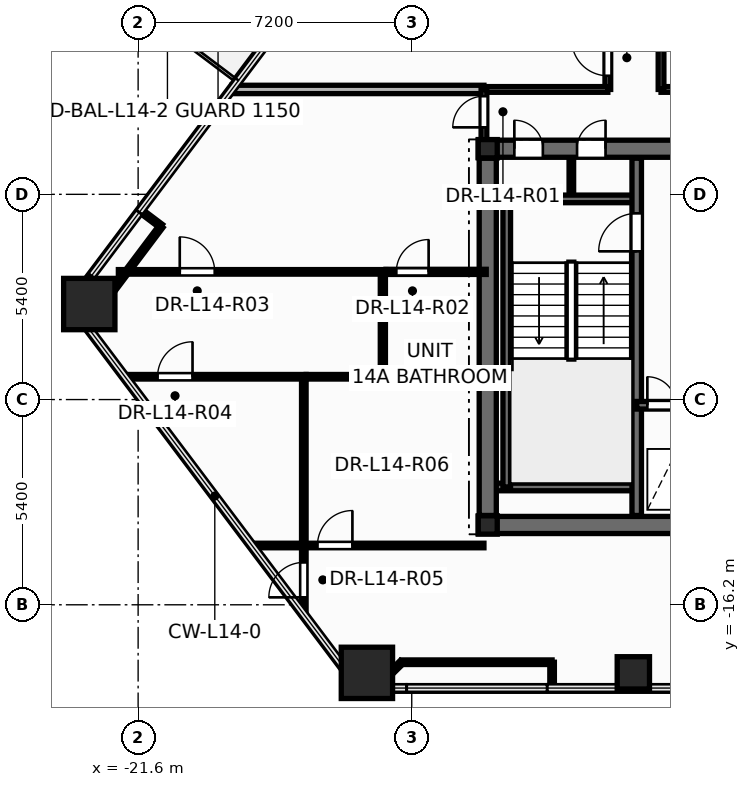
"""IFC4 building model, lengths in metres.
Left out: names, types, materials, properties, quantities, classifications, styles, units other than length and angle.
Written with IfcOpenShell. Run it as: python <this file> out.ifc"""

import sys

from ifc_helpers import new_model, si_unit, direction, frame, frame_2d, origin, origin_2d, place, context, subcontext, project, spatial, rectangle, hollow_rectangle, hollow_circle, i_section, extrude, element, fill, save


model = new_model("IFC4")
c1 = context("Model", 3, precision=1e-05, world=origin(), true_north=direction((0.0, 1.0)))
c2 = subcontext(c1, "Body", "Model", "MODEL_VIEW")
j1 = project(units=[si_unit("LENGTHUNIT", "METRE"), si_unit("PLANEANGLEUNIT", "RADIAN")], contexts=[c1])
p1 = place(None, origin())
s1 = spatial("IfcSite", under=j1, at=p1, CompositionType="ELEMENT")
p2 = place(p1, origin())
s2 = spatial("IfcBuilding", under=s1, at=p2, CompositionType="ELEMENT")
p3 = place(p2, frame((0.0, 0.0, 56.7)))
s3 = spatial("IfcBuildingStorey", under=s2, at=p3, CompositionType="ELEMENT", Elevation=56.7)
for number, where, z_axis, x_axis in (
    (1, (-22.885, -8.287, 0.0), (0.0, 0.0, 1.0), (1.0, 0.0, 0.0)),
    (2, (-15.58, -17.991, 0.0), (0.0, 0.0, 1.0), (1.0, 0.0, 0.0)),
):
    element("IfcColumn", number, at=place(p3, frame(where, z_axis=z_axis, x_axis=x_axis)), inside=s3, PredefinedType="COLUMN", context=c2, shape_type="SweptSolid", body=[
        extrude(hollow_rectangle(XDim=1.35, YDim=1.35, WallThickness=0.065, at=origin_2d()), origin(), (0.0, 0.0, 1.0), 3.6),
    ])
p4 = place(p3, frame((-8.569, -17.991, 0.0), z_axis=(0.0, 0.0, 1.0), x_axis=(1.0, 0.0, 0.0)))
e3 = element("IfcColumn", 3, at=p4, inside=s3, PredefinedType="COLUMN", context=c2, shape_type="SweptSolid", body=[
    extrude(hollow_circle(Radius=0.425, WallThickness=0.038, at=origin_2d()), origin(), (0.0, 0.0, 1.0), 3.6),
])
for number, where, z_axis, x_axis in (
    (4, (-12.4, -14.1, 0.0), (0.0, 0.0, 1.0), (1.0, 0.0, 0.0)),
    (5, (-12.4, -4.2, 0.0), (0.0, 0.0, 1.0), (1.0, 0.0, 0.0)),
):
    element("IfcColumn", number, at=place(p3, frame(where, z_axis=z_axis, x_axis=x_axis)), inside=s3, PredefinedType="COLUMN", context=c2, shape_type="SweptSolid", body=[
        extrude(i_section(OverallWidth=0.5, OverallDepth=0.482, WebThickness=0.04, FlangeThickness=0.045, at=origin_2d()), origin(), (0.0, 0.0, 1.0), 3.6),
    ])
p5 = place(p3, frame((-10.2, -5.52, 0.0), z_axis=(0.0, 0.0, 1.0), x_axis=(0.0, 1.0, 0.0)))
e6 = element("IfcWall", 6, at=p5, inside=s3, PredefinedType="PARTITIONING", context=c2, shape_type="SweptSolid", body=[
    extrude(rectangle(XDim=1.12, YDim=0.12, at=frame_2d((0.56, 0.0))), origin(), (0.0, 0.0, 1.0), 3.32),
])
p6 = place(p3, frame((-12.65, -14.1, 0.0), z_axis=(0.0, 0.0, 1.0), x_axis=(1.0, 0.0, 0.0)))
e7 = element("IfcWall", 7, at=p6, inside=s3, PredefinedType="SHEAR", context=c2, shape_type="SweptSolid", body=[
    extrude(rectangle(XDim=25.3, YDim=0.45, at=frame_2d((12.65, 0.0))), origin(), (0.0, 0.0, 1.0), 3.6),
])
p7 = place(p3, frame((-12.65, -4.2, 0.0), z_axis=(0.0, 0.0, 1.0), x_axis=(1.0, 0.0, 0.0)))
e8 = element("IfcWall", 8, at=p7, inside=s3, PredefinedType="SHEAR", context=c2, shape_type="SweptSolid", body=[
    extrude(rectangle(XDim=25.3, YDim=0.45, at=frame_2d((12.65, 0.0))), origin(), (0.0, 0.0, 1.0), 3.6),
])
p8 = place(p7, frame((0.95, 0.0, 0.0)))
e9 = element("IfcOpeningElement", 9, at=p8, cuts=e8, PredefinedType="OPENING", context=c2, shape_type="SweptSolid", body=[
    extrude(rectangle(XDim=0.756, YDim=2.054, at=frame_2d((0.375, 1.027))), frame((0.0, 0.235, 0.0), z_axis=(0.0, -1.0, 0.0), x_axis=(1.0, 0.0, 0.0)), (0.0, 0.0, 1.0), 0.47),
])
p9 = place(p7, frame((2.6, 0.0, 0.0)))
e10 = element("IfcOpeningElement", 10, at=p9, cuts=e8, PredefinedType="OPENING", context=c2, shape_type="SweptSolid", body=[
    extrude(rectangle(XDim=0.756, YDim=2.054, at=frame_2d((0.375, 1.027))), frame((0.0, 0.235, 0.0), z_axis=(0.0, -1.0, 0.0), x_axis=(1.0, 0.0, 0.0)), (0.0, 0.0, 1.0), 0.47),
])
p10 = place(p7, frame((21.85, 0.0, 0.0)))
e11 = element("IfcOpeningElement", 11, at=p10, cuts=e8, PredefinedType="OPENING", context=c2, shape_type="SweptSolid", body=[
    extrude(rectangle(XDim=0.756, YDim=2.054, at=frame_2d((0.375, 1.027))), frame((0.0, 0.235, 0.0), z_axis=(0.0, -1.0, 0.0), x_axis=(1.0, 0.0, 0.0)), (0.0, 0.0, 1.0), 0.47),
])
p11 = place(p7, frame((23.5, 0.0, 0.0)))
e12 = element("IfcOpeningElement", 12, at=p11, cuts=e8, PredefinedType="OPENING", context=c2, shape_type="SweptSolid", body=[
    extrude(rectangle(XDim=0.756, YDim=2.054, at=frame_2d((0.375, 1.027))), frame((0.0, 0.235, 0.0), z_axis=(0.0, -1.0, 0.0), x_axis=(1.0, 0.0, 0.0)), (0.0, 0.0, 1.0), 0.47),
])
p12 = place(p7, frame((5.85, 0.0, 0.0)))
e13 = element("IfcOpeningElement", 13, at=p12, cuts=e8, PredefinedType="OPENING", context=c2, shape_type="SweptSolid", body=[
    extrude(rectangle(XDim=1.006, YDim=2.104, at=frame_2d((0.5, 1.052))), frame((0.0, 0.235, 0.0), z_axis=(0.0, -1.0, 0.0), x_axis=(1.0, 0.0, 0.0)), (0.0, 0.0, 1.0), 0.47),
])
p13 = place(p7, frame((10.35, 0.0, 0.0)))
e14 = element("IfcOpeningElement", 14, at=p13, cuts=e8, PredefinedType="OPENING", context=c2, shape_type="SweptSolid", body=[
    extrude(rectangle(XDim=1.406, YDim=2.154, at=frame_2d((0.7, 1.077))), frame((0.0, 0.235, 0.0), z_axis=(0.0, -1.0, 0.0), x_axis=(1.0, 0.0, 0.0)), (0.0, 0.0, 1.0), 0.47),
])
p14 = place(p7, frame((18.45, 0.0, 0.0)))
e15 = element("IfcOpeningElement", 15, at=p14, cuts=e8, PredefinedType="OPENING", context=c2, shape_type="SweptSolid", body=[
    extrude(rectangle(XDim=1.006, YDim=2.104, at=frame_2d((0.5, 1.052))), frame((0.0, 0.235, 0.0), z_axis=(0.0, -1.0, 0.0), x_axis=(1.0, 0.0, 0.0)), (0.0, 0.0, 1.0), 0.47),
])
for number, where, z_axis, x_axis in (
    (16, (-12.35, -5.52, 0.0), (0.0, 0.0, 1.0), (1.0, 0.0, 0.0)),
    (17, (-12.35, -13.1, 0.0), (0.0, 0.0, 1.0), (1.0, 0.0, 0.0)),
):
    element("IfcWall", number, at=place(p3, frame(where, z_axis=z_axis, x_axis=x_axis)), inside=s3, PredefinedType="SOLIDWALL", context=c2, shape_type="SweptSolid", body=[
        extrude(rectangle(XDim=3.87, YDim=0.2, at=frame_2d((1.935, 0.0))), origin(), (0.0, 0.0, 1.0), 3.6),
    ])
p15 = place(p3, frame((-11.9, -13.1, 0.0), z_axis=(0.0, 0.0, 1.0), x_axis=(0.0, 1.0, 0.0)))
e18 = element("IfcWall", 18, at=p15, inside=s3, PredefinedType="SOLIDWALL", context=c2, shape_type="SweptSolid", body=[
    extrude(rectangle(XDim=7.58, YDim=0.2, at=frame_2d((3.79, 0.0))), origin(), (0.0, 0.0, 1.0), 3.6),
])
p16 = place(p3, frame((-8.48, -13.85, 0.0), z_axis=(0.0, 0.0, 1.0), x_axis=(0.0, 1.0, 0.0)))
e19 = element("IfcWall", 19, at=p16, inside=s3, PredefinedType="SHEAR", context=c2, shape_type="SweptSolid", body=[
    extrude(rectangle(XDim=9.4, YDim=0.25, at=frame_2d((4.7, 0.0))), origin(), (0.0, 0.0, 1.0), 3.6),
])
p17 = place(p16, frame((6.95, 0.0, 0.0)))
e20 = element("IfcOpeningElement", 20, at=p17, cuts=e19, PredefinedType="OPENING", context=c2, shape_type="SweptSolid", body=[
    extrude(rectangle(XDim=1.006, YDim=2.104, at=frame_2d((0.5, 1.052))), frame((0.0, 0.135, 0.0), z_axis=(0.0, -1.0, 0.0), x_axis=(1.0, 0.0, 0.0)), (0.0, 0.0, 1.0), 0.27),
])
p18 = place(p3, frame((-8.48, -10.95, 0.0), z_axis=(0.0, 0.0, 1.0), x_axis=(1.0, 0.0, 0.0)))
e21 = element("IfcWall", 21, at=p18, inside=s3, PredefinedType="SOLIDWALL", context=c2, shape_type="SweptSolid", body=[
    extrude(rectangle(XDim=3.36, YDim=0.2, at=frame_2d((1.68, 0.0))), origin(), (0.0, 0.0, 1.0), 3.6),
])
p19 = place(p18, frame((0.28, 0.0, 0.0)))
e22 = element("IfcOpeningElement", 22, at=p19, cuts=e21, PredefinedType="OPENING", context=c2, shape_type="SweptSolid", body=[
    extrude(rectangle(XDim=0.756, YDim=2.054, at=frame_2d((0.375, 1.027))), frame((0.0, 0.11, 0.0), z_axis=(0.0, -1.0, 0.0), x_axis=(1.0, 0.0, 0.0)), (0.0, 0.0, 1.0), 0.22),
])
p20 = place(p18, frame((1.85, 0.0, 0.0)))
e23 = element("IfcOpeningElement", 23, at=p20, cuts=e21, PredefinedType="OPENING", context=c2, shape_type="SweptSolid", body=[
    extrude(rectangle(XDim=1.106, YDim=2.104, at=frame_2d((0.55, 1.052))), frame((0.0, 0.11, 0.0), z_axis=(0.0, -1.0, 0.0), x_axis=(1.0, 0.0, 0.0)), (0.0, 0.0, 1.0), 0.22),
])
p21 = place(p3, frame((-12.4, -13.85, 0.0), z_axis=(0.0, 0.0, 1.0), x_axis=(0.0, 1.0, 0.0)))
e24 = element("IfcWall", 24, at=p21, inside=s3, PredefinedType="SHEAR", context=c2, shape_type="SweptSolid", body=[
    extrude(rectangle(XDim=9.4, YDim=0.45, at=frame_2d((4.7, 0.0))), origin(), (0.0, 0.0, 1.0), 3.6),
])
p22 = place(p3, frame((-7.84, -2.64, 0.0), z_axis=(0.0, 0.0, 1.0), x_axis=(1.0, 0.0, 0.0)))
e25 = element("IfcWall", 25, at=p22, inside=s3, PredefinedType="PARTITIONING", context=c2, shape_type="SweptSolid", body=[
    extrude(rectangle(XDim=9.1, YDim=0.15, at=frame_2d((4.55, 0.0))), origin(), (0.0, 0.0, 1.0), 2.295),
])
p23 = place(p22, frame((2.117, 0.0, 0.0)))
e26 = element("IfcOpeningElement", 26, at=p23, cuts=e25, PredefinedType="OPENING", context=c2, shape_type="SweptSolid", body=[
    extrude(rectangle(XDim=0.956, YDim=2.104, at=frame_2d((0.475, 1.052))), frame((0.0, 0.085, 0.0), z_axis=(0.0, -1.0, 0.0), x_axis=(1.0, 0.0, 0.0)), (0.0, 0.0, 1.0), 0.17),
])
p24 = place(p3, frame((-9.24, -2.64, 0.0), z_axis=(0.0, 0.0, 1.0), x_axis=(0.0, 1.0, 0.0)))
e27 = element("IfcWall", 27, at=p24, inside=s3, PredefinedType="PARTITIONING", context=c2, shape_type="SweptSolid", body=[
    extrude(rectangle(XDim=8.5, YDim=0.15, at=frame_2d((4.25, 0.0))), origin(), (0.0, 0.0, 1.0), 2.479),
])
p25 = place(p24, frame((0.36, 0.0, 0.0)))
e28 = element("IfcOpeningElement", 28, at=p25, cuts=e27, PredefinedType="OPENING", context=c2, shape_type="SweptSolid", body=[
    extrude(rectangle(XDim=0.956, YDim=2.104, at=frame_2d((0.475, 1.052))), frame((0.0, 0.085, 0.0), z_axis=(0.0, -1.0, 0.0), x_axis=(1.0, 0.0, 0.0)), (0.0, 0.0, 1.0), 0.17),
])
p26 = place(p3, frame((-7.84, -2.64, 0.0), z_axis=(0.0, 0.0, 1.0), x_axis=(0.0, 1.0, 0.0)))
e29 = element("IfcWall", 29, at=p26, inside=s3, PredefinedType="PARTITIONING", context=c2, shape_type="SweptSolid", body=[
    extrude(rectangle(XDim=8.84, YDim=0.15, at=frame_2d((4.42, 0.0))), origin(), (0.0, 0.0, 1.0), 2.479),
])
p27 = place(p3, frame((-22.12, -7.44, 0.0), z_axis=(0.0, 0.0, 1.0), x_axis=(1.0, 0.0, 0.0)))
e30 = element("IfcWall", 30, at=p27, inside=s3, PredefinedType="PARTITIONING", context=c2, shape_type="SweptSolid", body=[
    extrude(rectangle(XDim=7.04, YDim=0.12, at=frame_2d((3.52, 0.0))), origin(), (0.0, 0.0, 1.0), 2.295),
])
p28 = place(p27, frame((1.615, 0.0, 0.0)))
e31 = element("IfcOpeningElement", 31, at=p28, cuts=e30, PredefinedType="OPENING", context=c2, shape_type="SweptSolid", body=[
    extrude(rectangle(XDim=0.926, YDim=2.104, at=frame_2d((0.46, 1.052))), frame((0.0, 0.07, 0.0), z_axis=(0.0, -1.0, 0.0), x_axis=(1.0, 0.0, 0.0)), (0.0, 0.0, 1.0), 0.14),
])
p29 = place(p3, frame((-19.135, -2.64, 0.0), z_axis=(0.0, 0.0, 1.0), x_axis=(1.0, 0.0, 0.0)))
e32 = element("IfcWall", 32, at=p29, inside=s3, PredefinedType="PARTITIONING", context=c2, shape_type="SweptSolid", body=[
    extrude(rectangle(XDim=6.635, YDim=0.22, at=frame_2d((3.318, 0.0))), origin(), (0.0, 0.0, 1.0), 2.683),
])
p30 = place(p3, frame((-17.24, -16.45, 0.0), z_axis=(0.0, 0.0, 1.0), x_axis=(0.0, 1.0, 0.0)))
e33 = element("IfcWall", 33, at=p30, inside=s3, PredefinedType="PARTITIONING", context=c2, shape_type="SweptSolid", body=[
    extrude(rectangle(XDim=6.25, YDim=0.12, at=frame_2d((3.125, 0.0))), origin(), (0.0, 0.0, 1.0), 2.683),
])
p31 = place(p30, frame((0.446, 0.0, 0.0)))
e34 = element("IfcOpeningElement", 34, at=p31, cuts=e33, PredefinedType="OPENING", context=c2, shape_type="SweptSolid", body=[
    extrude(rectangle(XDim=0.926, YDim=2.104, at=frame_2d((0.46, 1.052))), frame((0.0, 0.07, 0.0), z_axis=(0.0, -1.0, 0.0), x_axis=(1.0, 0.0, 0.0)), (0.0, 0.0, 1.0), 0.14),
])
p32 = place(p3, frame((-18.603, -14.64, 0.0), z_axis=(0.0, 0.0, 1.0), x_axis=(1.0, 0.0, 0.0)))
e35 = element("IfcWall", 35, at=p32, inside=s3, PredefinedType="PARTITIONING", context=c2, shape_type="SweptSolid", body=[
    extrude(rectangle(XDim=6.103, YDim=0.12, at=frame_2d((3.052, 0.0))), origin(), (0.0, 0.0, 1.0), 2.683),
])
p33 = place(p32, frame((1.722, 0.0, 0.0)))
e36 = element("IfcOpeningElement", 36, at=p33, cuts=e35, PredefinedType="OPENING", context=c2, shape_type="SweptSolid", body=[
    extrude(rectangle(XDim=0.926, YDim=2.104, at=frame_2d((0.46, 1.052))), frame((0.0, 0.07, 0.0), z_axis=(0.0, -1.0, 0.0), x_axis=(1.0, 0.0, 0.0)), (0.0, 0.0, 1.0), 0.14),
])
p34 = place(p3, frame((-21.946, -10.2, 0.0), z_axis=(0.0, 0.0, 1.0), x_axis=(1.0, 0.0, 0.0)))
e37 = element("IfcWall", 37, at=p34, inside=s3, PredefinedType="PARTITIONING", context=c2, shape_type="SweptSolid", body=[
    extrude(rectangle(XDim=4.766, YDim=0.12, at=frame_2d((2.383, 0.0))), origin(), (0.0, 0.0, 1.0), 2.683),
])
p35 = place(p34, frame((0.857, 0.0, 0.0)))
e38 = element("IfcOpeningElement", 38, at=p35, cuts=e37, PredefinedType="OPENING", context=c2, shape_type="SweptSolid", body=[
    extrude(rectangle(XDim=0.926, YDim=2.104, at=frame_2d((0.46, 1.052))), frame((0.0, 0.07, 0.0), z_axis=(0.0, -1.0, 0.0), x_axis=(1.0, 0.0, 0.0)), (0.0, 0.0, 1.0), 0.14),
])
p36 = place(p3, frame((-14.666, -17.711, 0.0), z_axis=(0.0, 0.0, 1.0), x_axis=(1.0, 0.0, 0.0)))
e39 = element("IfcWall", 39, at=p36, inside=s3, PredefinedType="PARTITIONING", context=c2, shape_type="SweptSolid", body=[
    extrude(rectangle(XDim=3.959, YDim=0.12, at=frame_2d((1.979, 0.0))), origin(), (0.0, 0.0, 1.0), 3.32),
])
p37 = place(p3, frame((-12.5, -2.64, 0.0), z_axis=(0.0, 0.0, 1.0), x_axis=(1.0, 0.0, 0.0)))
e40 = element("IfcWall", 40, at=p37, inside=s3, PredefinedType="PARTITIONING", context=c2, shape_type="SweptSolid", body=[
    extrude(rectangle(XDim=3.26, YDim=0.15, at=frame_2d((1.63, 0.0))), origin(), (0.0, 0.0, 1.0), 3.32),
])
p38 = place(p3, frame((-15.078, -7.44, 0.0), z_axis=(0.0, 0.0, 1.0), x_axis=(1.0, 0.0, 0.0)))
e41 = element("IfcWall", 41, at=p38, inside=s3, PredefinedType="PARTITIONING", context=c2, shape_type="SweptSolid", body=[
    extrude(rectangle(XDim=2.638, YDim=0.135, at=frame_2d((1.319, 0.0))), origin(), (0.0, 0.0, 1.0), 2.683),
])
p39 = place(p38, frame((0.272, 0.0, 0.0)))
e42 = element("IfcOpeningElement", 42, at=p39, cuts=e41, PredefinedType="OPENING", context=c2, shape_type="SweptSolid", body=[
    extrude(rectangle(XDim=0.856, YDim=2.104, at=frame_2d((0.425, 1.052))), frame((0.0, 0.078, 0.0), z_axis=(0.0, -1.0, 0.0), x_axis=(1.0, 0.0, 0.0)), (0.0, 0.0, 1.0), 0.155),
])
p40 = place(p3, frame((-15.16, -10.2, 0.0), z_axis=(0.0, 0.0, 1.0), x_axis=(0.0, 1.0, 0.0)))
e43 = element("IfcWall", 43, at=p40, inside=s3, PredefinedType="PARTITIONING", context=c2, shape_type="SweptSolid", body=[
    extrude(rectangle(XDim=2.76, YDim=0.135, at=frame_2d((1.38, 0.0))), origin(), (0.0, 0.0, 1.0), 3.32),
])
p41 = place(p3, frame((-15.16, -10.2, 0.0), z_axis=(0.0, 0.0, 1.0), x_axis=(1.0, 0.0, 0.0)))
e44 = element("IfcWall", 44, at=p41, inside=s3, PredefinedType="PARTITIONING", context=c2, shape_type="SweptSolid", body=[
    extrude(rectangle(XDim=2.72, YDim=0.135, at=frame_2d((1.36, 0.0))), origin(), (0.0, 0.0, 1.0), 2.683),
])
p42 = place(p3, frame((-20.994, -6.239, 0.0), z_axis=(0.0, 0.0, 1.0), x_axis=(-0.601407243549, -0.798942630861, 0.0)))
e45 = element("IfcWall", 45, at=p42, inside=s3, PredefinedType="PARTITIONING", context=c2, shape_type="SweptSolid", body=[
    extrude(rectangle(XDim=2.247, YDim=0.12, at=frame_2d((1.124, 0.0))), origin(), (0.0, 0.0, 1.0), 2.295),
])
p43 = place(p3, frame((-17.178, -10.2, 0.0), z_axis=(0.0, 0.0, 1.0), x_axis=(1.0, 0.0, 0.0)))
e46 = element("IfcWall", 46, at=p43, inside=s3, PredefinedType="PARTITIONING", context=c2, shape_type="SweptSolid", body=[
    extrude(rectangle(XDim=2.018, YDim=0.12, at=frame_2d((1.009, 0.0))), origin(), (0.0, 0.0, 1.0), 3.32),
])
p44 = place(p3, frame((-12.5, -4.24, 0.0), z_axis=(0.0, 0.0, 1.0), x_axis=(0.0, 1.0, 0.0)))
e47 = element("IfcWall", 47, at=p44, inside=s3, PredefinedType="PARTITIONING", context=c2, shape_type="SweptSolid", body=[
    extrude(rectangle(XDim=1.6, YDim=0.15, at=frame_2d((0.8, 0.0))), origin(), (0.0, 0.0, 1.0), 2.295),
])
p45 = place(p44, frame((0.602, 0.0, 0.0)))
e48 = element("IfcOpeningElement", 48, at=p45, cuts=e47, PredefinedType="OPENING", context=c2, shape_type="SweptSolid", body=[
    extrude(rectangle(XDim=0.826, YDim=2.104, at=frame_2d((0.41, 1.052))), frame((0.0, 0.085, 0.0), z_axis=(0.0, -1.0, 0.0), x_axis=(1.0, 0.0, 0.0)), (0.0, 0.0, 1.0), 0.17),
])
p46 = place(p3, frame((-15.271, -18.307, 0.0), z_axis=(0.0, 0.0, 1.0), x_axis=(0.712544720488, 0.701626696545, 0.0)))
e49 = element("IfcWall", 49, at=p46, inside=s3, PredefinedType="PARTITIONING", context=c2, shape_type="SweptSolid", body=[
    extrude(rectangle(XDim=0.85, YDim=0.12, at=frame_2d((0.425, 0.0))), origin(), (0.0, 0.0, 1.0), 2.683),
])
p47 = place(p3, frame((-22.345, -8.034, 0.0), z_axis=(0.0, 0.0, 1.0), x_axis=(-0.993721326988, -0.111883530014, 0.0)))
e50 = element("IfcWall", 50, at=p47, inside=s3, PredefinedType="PARTITIONING", context=c2, shape_type="SweptSolid", body=[
    extrude(rectangle(XDim=0.849, YDim=0.12, at=frame_2d((0.424, 0.0))), origin(), (0.0, 0.0, 1.0), 2.295),
])
for number, where, z_axis, x_axis in (
    (51, (-10.707, -17.711, 0.0), (0.0, 0.0, 1.0), (0.0, -1.0, 0.0)),
    (52, (-21.529, -5.836, 0.0), (0.0, 0.0, 1.0), (0.799, -0.602, 0.0)),
):
    element("IfcWall", number, at=place(p3, frame(where, z_axis=z_axis, x_axis=x_axis)), inside=s3, PredefinedType="PARTITIONING", context=c2, shape_type="SweptSolid", body=[
        extrude(rectangle(XDim=0.67, YDim=0.12, at=frame_2d((0.335, 0.0))), origin(), (0.0, 0.0, 1.0), 2.683),
    ])
p48 = place(p17, origin())
e53 = element("IfcDoor", 53, at=p48, inside=s3, OperationType="SINGLE_SWING_LEFT", PredefinedType="DOOR", context=c2, shape_type="SweptSolid", body=[
    extrude(rectangle(XDim=1.0, YDim=2.1, at=frame_2d((0.5, 1.05))), frame((0.0, 0.025, 0.0), z_axis=(0.0, -1.0, 0.0), x_axis=(1.0, 0.0, 0.0)), (0.0, 0.0, 1.0), 0.05),
])
fill(e20, e53)
p49 = place(p19, origin())
e54 = element("IfcDoor", 54, at=p49, inside=s3, OperationType="SINGLE_SWING_LEFT", PredefinedType="DOOR", context=c2, shape_type="SweptSolid", body=[
    extrude(rectangle(XDim=0.75, YDim=2.05, at=frame_2d((0.375, 1.025))), frame((0.0, 0.025, 0.0), z_axis=(0.0, -1.0, 0.0), x_axis=(1.0, 0.0, 0.0)), (0.0, 0.0, 1.0), 0.05),
])
fill(e22, e54)
p50 = place(p8, origin())
e55 = element("IfcDoor", 55, at=p50, inside=s3, OperationType="SINGLE_SWING_LEFT", PredefinedType="DOOR", context=c2, shape_type="SweptSolid", body=[
    extrude(rectangle(XDim=0.75, YDim=2.05, at=frame_2d((0.375, 1.025))), frame((0.0, 0.025, 0.0), z_axis=(0.0, -1.0, 0.0), x_axis=(1.0, 0.0, 0.0)), (0.0, 0.0, 1.0), 0.05),
])
fill(e9, e55)
p51 = place(p9, origin())
e56 = element("IfcDoor", 56, at=p51, inside=s3, OperationType="SINGLE_SWING_RIGHT", PredefinedType="DOOR", context=c2, shape_type="SweptSolid", body=[
    extrude(rectangle(XDim=0.75, YDim=2.05, at=frame_2d((0.375, 1.025))), frame((0.0, 0.025, 0.0), z_axis=(0.0, -1.0, 0.0), x_axis=(1.0, 0.0, 0.0)), (0.0, 0.0, 1.0), 0.05),
])
fill(e10, e56)
p52 = place(p45, origin())
e57 = element("IfcDoor", 57, at=p52, inside=s3, OperationType="SINGLE_SWING_LEFT", PredefinedType="DOOR", context=c2, shape_type="SweptSolid", body=[
    extrude(rectangle(XDim=0.82, YDim=2.1, at=frame_2d((0.41, 1.05))), frame((0.0, 0.025, 0.0), z_axis=(0.0, -1.0, 0.0), x_axis=(1.0, 0.0, 0.0)), (0.0, 0.0, 1.0), 0.05),
])
fill(e48, e57)
p53 = place(p39, origin())
e58 = element("IfcDoor", 58, at=p53, inside=s3, OperationType="SINGLE_SWING_RIGHT", PredefinedType="DOOR", context=c2, shape_type="SweptSolid", body=[
    extrude(rectangle(XDim=0.85, YDim=2.1, at=frame_2d((0.425, 1.05))), frame((0.0, 0.025, 0.0), z_axis=(0.0, -1.0, 0.0), x_axis=(1.0, 0.0, 0.0)), (0.0, 0.0, 1.0), 0.05),
])
fill(e42, e58)
p54 = place(p28, origin())
e59 = element("IfcDoor", 59, at=p54, inside=s3, OperationType="SINGLE_SWING_LEFT", PredefinedType="DOOR", context=c2, shape_type="SweptSolid", body=[
    extrude(rectangle(XDim=0.92, YDim=2.1, at=frame_2d((0.46, 1.05))), frame((0.0, 0.025, 0.0), z_axis=(0.0, -1.0, 0.0), x_axis=(1.0, 0.0, 0.0)), (0.0, 0.0, 1.0), 0.05),
])
fill(e31, e59)
p55 = place(p35, origin())
e60 = element("IfcDoor", 60, at=p55, inside=s3, OperationType="SINGLE_SWING_RIGHT", PredefinedType="DOOR", context=c2, shape_type="SweptSolid", body=[
    extrude(rectangle(XDim=0.92, YDim=2.1, at=frame_2d((0.46, 1.05))), frame((0.0, 0.025, 0.0), z_axis=(0.0, -1.0, 0.0), x_axis=(1.0, 0.0, 0.0)), (0.0, 0.0, 1.0), 0.05),
])
fill(e38, e60)
p56 = place(p31, origin())
e61 = element("IfcDoor", 61, at=p56, inside=s3, OperationType="SINGLE_SWING_LEFT", PredefinedType="DOOR", context=c2, shape_type="SweptSolid", body=[
    extrude(rectangle(XDim=0.92, YDim=2.1, at=frame_2d((0.46, 1.05))), frame((0.0, 0.025, 0.0), z_axis=(0.0, -1.0, 0.0), x_axis=(1.0, 0.0, 0.0)), (0.0, 0.0, 1.0), 0.05),
])
fill(e34, e61)
p57 = place(p33, origin())
e62 = element("IfcDoor", 62, at=p57, inside=s3, OperationType="SINGLE_SWING_RIGHT", PredefinedType="DOOR", context=c2, shape_type="SweptSolid", body=[
    extrude(rectangle(XDim=0.92, YDim=2.1, at=frame_2d((0.46, 1.05))), frame((0.0, 0.025, 0.0), z_axis=(0.0, -1.0, 0.0), x_axis=(1.0, 0.0, 0.0)), (0.0, 0.0, 1.0), 0.05),
])
fill(e36, e62)
p58 = place(p25, origin())
e63 = element("IfcDoor", 63, at=p58, inside=s3, OperationType="SINGLE_SWING_RIGHT", PredefinedType="DOOR", context=c2, shape_type="SweptSolid", body=[
    extrude(rectangle(XDim=0.95, YDim=2.1, at=frame_2d((0.475, 1.05))), frame((0.0, 0.025, 0.0), z_axis=(0.0, -1.0, 0.0), x_axis=(1.0, 0.0, 0.0)), (0.0, 0.0, 1.0), 0.05),
])
fill(e28, e63)
save(model, sys.argv[1])
